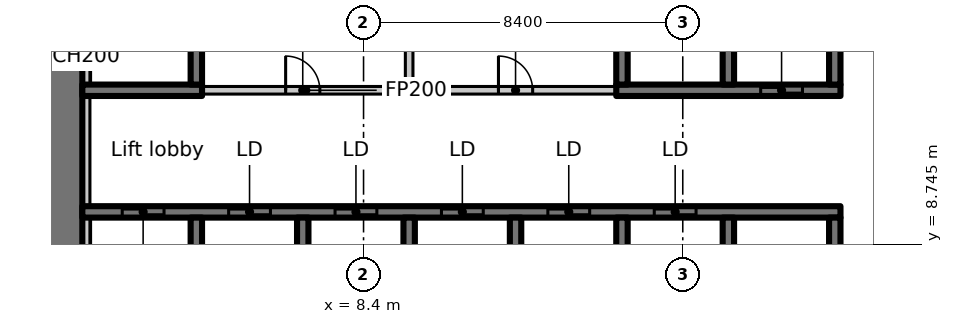
"""IFC4 building model, lengths in metres.
Left out: names, types, materials, properties, quantities, classifications, styles, units other than length and angle.
Written with IfcOpenShell. Run it as: python <this file> out.ifc"""

import sys

from ifc_helpers import new_model, si_unit, direction, frame, frame_2d, origin, place, context, subcontext, project, spatial, rectangle, extrude, element, fill, save


model = new_model("IFC4")
c1 = context("Model", 3, precision=1e-05, world=origin(), true_north=direction((0.0, 1.0)))
c2 = subcontext(c1, "Body", "Model", "MODEL_VIEW")
j1 = project(units=[si_unit("LENGTHUNIT", "METRE"), si_unit("PLANEANGLEUNIT", "RADIAN")], contexts=[c1])
p1 = place(None, origin())
s1 = spatial("IfcSite", under=j1, at=p1, CompositionType="ELEMENT")
p2 = place(p1, origin())
s2 = spatial("IfcBuilding", under=s1, at=p2, CompositionType="ELEMENT")
p3 = place(p2, frame((0.0, 0.0, 65.3)))
s3 = spatial("IfcBuildingStorey", under=s2, at=p3, CompositionType="ELEMENT", Elevation=65.3)
p4 = place(p3, frame((0.5, 6.936, 0.0), z_axis=(0.0, 0.0, 1.0), x_axis=(0.0, 1.0, 0.0)))
e1 = element("IfcWall", 1, at=p4, inside=s3, PredefinedType="SHEAR", context=c2, shape_type="SweptSolid", body=[
    extrude(rectangle(XDim=8.864, YDim=1.0, at=frame_2d((4.432, 0.0))), origin(), (0.0, 0.0, 1.0), 3.35),
])
p5 = place(p3, frame((1.0, 9.6, 0.0), z_axis=(0.0, 0.0, 1.0), x_axis=(1.0, 0.0, 0.0)))
e2 = element("IfcWall", 2, at=p5, inside=s3, PredefinedType="SHEAR", context=c2, shape_type="SweptSolid", body=[
    extrude(rectangle(XDim=19.95, YDim=0.3, at=frame_2d((9.975, 0.0))), origin(), (0.0, 0.0, 1.0), 3.35),
])
p6 = place(p5, frame((1.05, 0.0, 0.0)))
e3 = element("IfcOpeningElement", 3, at=p6, cuts=e2, PredefinedType="OPENING", context=c2, shape_type="SweptSolid", body=[
    extrude(rectangle(XDim=1.1, YDim=2.3, at=frame_2d((0.55, 1.15))), frame((0.0, 0.16, 0.0), z_axis=(0.0, -1.0, 0.0), x_axis=(1.0, 0.0, 0.0)), (0.0, 0.0, 1.0), 0.32),
])
p7 = place(p5, frame((3.85, 0.0, 0.0)))
e4 = element("IfcOpeningElement", 4, at=p7, cuts=e2, PredefinedType="OPENING", context=c2, shape_type="SweptSolid", body=[
    extrude(rectangle(XDim=1.1, YDim=2.3, at=frame_2d((0.55, 1.15))), frame((0.0, 0.16, 0.0), z_axis=(0.0, -1.0, 0.0), x_axis=(1.0, 0.0, 0.0)), (0.0, 0.0, 1.0), 0.32),
])
p8 = place(p5, frame((6.65, 0.0, 0.0)))
e5 = element("IfcOpeningElement", 5, at=p8, cuts=e2, PredefinedType="OPENING", context=c2, shape_type="SweptSolid", body=[
    extrude(rectangle(XDim=1.1, YDim=2.3, at=frame_2d((0.55, 1.15))), frame((0.0, 0.16, 0.0), z_axis=(0.0, -1.0, 0.0), x_axis=(1.0, 0.0, 0.0)), (0.0, 0.0, 1.0), 0.32),
])
p9 = place(p5, frame((9.45, 0.0, 0.0)))
e6 = element("IfcOpeningElement", 6, at=p9, cuts=e2, PredefinedType="OPENING", context=c2, shape_type="SweptSolid", body=[
    extrude(rectangle(XDim=1.1, YDim=2.3, at=frame_2d((0.55, 1.15))), frame((0.0, 0.16, 0.0), z_axis=(0.0, -1.0, 0.0), x_axis=(1.0, 0.0, 0.0)), (0.0, 0.0, 1.0), 0.32),
])
p10 = place(p5, frame((12.25, 0.0, 0.0)))
e7 = element("IfcOpeningElement", 7, at=p10, cuts=e2, PredefinedType="OPENING", context=c2, shape_type="SweptSolid", body=[
    extrude(rectangle(XDim=1.1, YDim=2.3, at=frame_2d((0.55, 1.15))), frame((0.0, 0.16, 0.0), z_axis=(0.0, -1.0, 0.0), x_axis=(1.0, 0.0, 0.0)), (0.0, 0.0, 1.0), 0.32),
])
p11 = place(p5, frame((15.05, 0.0, 0.0)))
e8 = element("IfcOpeningElement", 8, at=p11, cuts=e2, PredefinedType="OPENING", context=c2, shape_type="SweptSolid", body=[
    extrude(rectangle(XDim=1.1, YDim=2.3, at=frame_2d((0.55, 1.15))), frame((0.0, 0.16, 0.0), z_axis=(0.0, -1.0, 0.0), x_axis=(1.0, 0.0, 0.0)), (0.0, 0.0, 1.0), 0.32),
])
for number, where, z_axis, x_axis in (
    (9, (4.0, 7.15, 0.0), (0.0, 0.0, 1.0), (0.0, 1.0, 0.0)),
    (10, (6.8, 7.15, 0.0), (0.0, 0.0, 1.0), (0.0, 1.0, 0.0)),
    (11, (9.6, 7.15, 0.0), (0.0, 0.0, 1.0), (0.0, 1.0, 0.0)),
    (12, (12.4, 7.15, 0.0), (0.0, 0.0, 1.0), (0.0, 1.0, 0.0)),
    (13, (15.2, 7.15, 0.0), (0.0, 0.0, 1.0), (0.0, 1.0, 0.0)),
    (14, (18.0, 7.15, 0.0), (0.0, 0.0, 1.0), (0.0, 1.0, 0.0)),
    (15, (20.8, 7.15, 0.0), (0.0, 0.0, 1.0), (0.0, 1.0, 0.0)),
):
    element("IfcWall", number, at=place(p3, frame(where, z_axis=z_axis, x_axis=x_axis)), inside=s3, PredefinedType="SHEAR", context=c2, shape_type="SweptSolid", body=[
        extrude(rectangle(XDim=2.3, YDim=0.3, at=frame_2d((1.15, 0.0))), origin(), (0.0, 0.0, 1.0), 3.35),
    ])
p12 = place(p3, frame((1.0, 12.8, 0.0), z_axis=(0.0, 0.0, 1.0), x_axis=(1.0, 0.0, 0.0)))
e16 = element("IfcWall", 16, at=p12, inside=s3, PredefinedType="SHEAR", context=c2, shape_type="SweptSolid", body=[
    extrude(rectangle(XDim=3.15, YDim=0.3, at=frame_2d((1.575, 0.0))), origin(), (0.0, 0.0, 1.0), 3.35),
])
p13 = place(p3, frame((4.0, 12.95, 0.0), z_axis=(0.0, 0.0, 1.0), x_axis=(0.0, 1.0, 0.0)))
e17 = element("IfcWall", 17, at=p13, inside=s3, PredefinedType="SHEAR", context=c2, shape_type="SweptSolid", body=[
    extrude(rectangle(XDim=2.85, YDim=0.3, at=frame_2d((1.425, 0.0))), origin(), (0.0, 0.0, 1.0), 3.35),
])
p14 = place(p3, frame((15.05, 12.8, 0.0), z_axis=(0.0, 0.0, 1.0), x_axis=(1.0, 0.0, 0.0)))
e18 = element("IfcWall", 18, at=p14, inside=s3, PredefinedType="SHEAR", context=c2, shape_type="SweptSolid", body=[
    extrude(rectangle(XDim=5.9, YDim=0.3, at=frame_2d((2.95, 0.0))), origin(), (0.0, 0.0, 1.0), 3.35),
])
p15 = place(p14, frame((3.8, 0.0, 0.0)))
e19 = element("IfcOpeningElement", 19, at=p15, cuts=e18, PredefinedType="OPENING", context=c2, shape_type="SweptSolid", body=[
    extrude(rectangle(XDim=1.1, YDim=2.3, at=frame_2d((0.55, 1.15))), frame((0.0, 0.16, 0.0), z_axis=(0.0, -1.0, 0.0), x_axis=(1.0, 0.0, 0.0)), (0.0, 0.0, 1.0), 0.32),
])
for number, where, z_axis, x_axis in (
    (20, (15.2, 12.95, 0.0), (0.0, 0.0, 1.0), (0.0, 1.0, 0.0)),
    (21, (18.0, 12.95, 0.0), (0.0, 0.0, 1.0), (0.0, 1.0, 0.0)),
    (22, (20.8, 12.95, 0.0), (0.0, 0.0, 1.0), (0.0, 1.0, 0.0)),
):
    element("IfcWall", number, at=place(p3, frame(where, z_axis=z_axis, x_axis=x_axis)), inside=s3, PredefinedType="SHEAR", context=c2, shape_type="SweptSolid", body=[
        extrude(rectangle(XDim=2.85, YDim=0.3, at=frame_2d((1.425, 0.0))), origin(), (0.0, 0.0, 1.0), 3.35),
    ])
p16 = place(p3, frame((4.162, 12.8, 0.0), z_axis=(0.0, 0.0, 1.0), x_axis=(1.0, 0.0, 0.0)))
e23 = element("IfcWall", 23, at=p16, inside=s3, PredefinedType="PARTITIONING", context=c2, shape_type="SweptSolid", body=[
    extrude(rectangle(XDim=5.438, YDim=0.2, at=frame_2d((2.719, 0.0))), origin(), (0.0, 0.0, 1.0), 3.35),
])
p17 = place(p16, frame((2.188, 0.0, 0.0)))
e24 = element("IfcOpeningElement", 24, at=p17, cuts=e23, PredefinedType="OPENING", context=c2, shape_type="SweptSolid", body=[
    extrude(rectangle(XDim=0.9, YDim=2.1, at=frame_2d((0.45, 1.05))), frame((0.0, 0.11, 0.0), z_axis=(0.0, -1.0, 0.0), x_axis=(1.0, 0.0, 0.0)), (0.0, 0.0, 1.0), 0.22),
])
p18 = place(p3, frame((9.6, 12.8, 0.0), z_axis=(0.0, 0.0, 1.0), x_axis=(1.0, 0.0, 0.0)))
e25 = element("IfcWall", 25, at=p18, inside=s3, PredefinedType="PARTITIONING", context=c2, shape_type="SweptSolid", body=[
    extrude(rectangle(XDim=5.438, YDim=0.2, at=frame_2d((2.719, 0.0))), origin(), (0.0, 0.0, 1.0), 3.35),
])
p19 = place(p18, frame((2.35, 0.0, 0.0)))
e26 = element("IfcOpeningElement", 26, at=p19, cuts=e25, PredefinedType="OPENING", context=c2, shape_type="SweptSolid", body=[
    extrude(rectangle(XDim=0.9, YDim=2.1, at=frame_2d((0.45, 1.05))), frame((0.0, 0.11, 0.0), z_axis=(0.0, -1.0, 0.0), x_axis=(1.0, 0.0, 0.0)), (0.0, 0.0, 1.0), 0.22),
])
p20 = place(p3, frame((9.6, 15.588, 0.0), z_axis=(0.0, 0.0, 1.0), x_axis=(0.0, -1.0, 0.0)))
e27 = element("IfcWall", 27, at=p20, inside=s3, PredefinedType="PARTITIONING", context=c2, shape_type="SweptSolid", body=[
    extrude(rectangle(XDim=2.688, YDim=0.2, at=frame_2d((1.344, 0.0))), origin(), (0.0, 0.0, 1.0), 3.35),
])
p21 = place(p3, frame((1.1, 7.15, 0.0), z_axis=(0.0, 0.0, 1.0), x_axis=(0.0, 1.0, 0.0)))
e28 = element("IfcWall", 28, at=p21, inside=s3, PredefinedType="PARTITIONING", context=c2, shape_type="SweptSolid", body=[
    extrude(rectangle(XDim=2.3, YDim=0.2, at=frame_2d((1.15, 0.0))), origin(), (0.0, 0.0, 1.0), 3.35),
])
p22 = place(p3, frame((1.1, 9.75, 0.0), z_axis=(0.0, 0.0, 1.0), x_axis=(0.0, 1.0, 0.0)))
e29 = element("IfcWall", 29, at=p22, inside=s3, PredefinedType="PARTITIONING", context=c2, shape_type="SweptSolid", body=[
    extrude(rectangle(XDim=2.9, YDim=0.2, at=frame_2d((1.45, 0.0))), origin(), (0.0, 0.0, 1.0), 3.35),
])
p23 = place(p3, frame((1.1, 12.95, 0.0), z_axis=(0.0, 0.0, 1.0), x_axis=(0.0, 1.0, 0.0)))
e30 = element("IfcWall", 30, at=p23, inside=s3, PredefinedType="PARTITIONING", context=c2, shape_type="SweptSolid", body=[
    extrude(rectangle(XDim=2.65, YDim=0.2, at=frame_2d((1.325, 0.0))), origin(), (0.0, 0.0, 1.0), 3.35),
])
p24 = place(p6, origin())
e31 = element("IfcDoor", 31, at=p24, inside=s3, OperationType="SLIDING_TO_LEFT", PredefinedType="DOOR", context=c2, shape_type="SweptSolid", body=[
    extrude(rectangle(XDim=1.1, YDim=2.3, at=frame_2d((0.55, 1.15))), frame((0.0, 0.025, 0.0), z_axis=(0.0, -1.0, 0.0), x_axis=(1.0, 0.0, 0.0)), (0.0, 0.0, 1.0), 0.05),
])
fill(e3, e31)
p25 = place(p7, origin())
e32 = element("IfcDoor", 32, at=p25, inside=s3, OperationType="SLIDING_TO_LEFT", PredefinedType="DOOR", context=c2, shape_type="SweptSolid", body=[
    extrude(rectangle(XDim=1.1, YDim=2.3, at=frame_2d((0.55, 1.15))), frame((0.0, 0.025, 0.0), z_axis=(0.0, -1.0, 0.0), x_axis=(1.0, 0.0, 0.0)), (0.0, 0.0, 1.0), 0.05),
])
fill(e4, e32)
p26 = place(p8, origin())
e33 = element("IfcDoor", 33, at=p26, inside=s3, OperationType="SLIDING_TO_LEFT", PredefinedType="DOOR", context=c2, shape_type="SweptSolid", body=[
    extrude(rectangle(XDim=1.1, YDim=2.3, at=frame_2d((0.55, 1.15))), frame((0.0, 0.025, 0.0), z_axis=(0.0, -1.0, 0.0), x_axis=(1.0, 0.0, 0.0)), (0.0, 0.0, 1.0), 0.05),
])
fill(e5, e33)
p27 = place(p9, origin())
e34 = element("IfcDoor", 34, at=p27, inside=s3, OperationType="SLIDING_TO_LEFT", PredefinedType="DOOR", context=c2, shape_type="SweptSolid", body=[
    extrude(rectangle(XDim=1.1, YDim=2.3, at=frame_2d((0.55, 1.15))), frame((0.0, 0.025, 0.0), z_axis=(0.0, -1.0, 0.0), x_axis=(1.0, 0.0, 0.0)), (0.0, 0.0, 1.0), 0.05),
])
fill(e6, e34)
p28 = place(p10, origin())
e35 = element("IfcDoor", 35, at=p28, inside=s3, OperationType="SLIDING_TO_LEFT", PredefinedType="DOOR", context=c2, shape_type="SweptSolid", body=[
    extrude(rectangle(XDim=1.1, YDim=2.3, at=frame_2d((0.55, 1.15))), frame((0.0, 0.025, 0.0), z_axis=(0.0, -1.0, 0.0), x_axis=(1.0, 0.0, 0.0)), (0.0, 0.0, 1.0), 0.05),
])
fill(e7, e35)
p29 = place(p11, origin())
e36 = element("IfcDoor", 36, at=p29, inside=s3, OperationType="SLIDING_TO_LEFT", PredefinedType="DOOR", context=c2, shape_type="SweptSolid", body=[
    extrude(rectangle(XDim=1.1, YDim=2.3, at=frame_2d((0.55, 1.15))), frame((0.0, 0.025, 0.0), z_axis=(0.0, -1.0, 0.0), x_axis=(1.0, 0.0, 0.0)), (0.0, 0.0, 1.0), 0.05),
])
fill(e8, e36)
p30 = place(p15, origin())
e37 = element("IfcDoor", 37, at=p30, inside=s3, OperationType="SLIDING_TO_LEFT", PredefinedType="DOOR", context=c2, shape_type="SweptSolid", body=[
    extrude(rectangle(XDim=1.1, YDim=2.3, at=frame_2d((0.55, 1.15))), frame((0.0, 0.025, 0.0), z_axis=(0.0, -1.0, 0.0), x_axis=(1.0, 0.0, 0.0)), (0.0, 0.0, 1.0), 0.05),
])
fill(e19, e37)
p31 = place(p17, origin())
e38 = element("IfcDoor", 38, at=p31, inside=s3, OperationType="SINGLE_SWING_RIGHT", PredefinedType="DOOR", context=c2, shape_type="SweptSolid", body=[
    extrude(rectangle(XDim=0.9, YDim=2.1, at=frame_2d((0.45, 1.05))), frame((0.0, 0.025, 0.0), z_axis=(0.0, -1.0, 0.0), x_axis=(1.0, 0.0, 0.0)), (0.0, 0.0, 1.0), 0.05),
])
fill(e24, e38)
p32 = place(p19, origin())
e39 = element("IfcDoor", 39, at=p32, inside=s3, OperationType="SINGLE_SWING_LEFT", PredefinedType="DOOR", context=c2, shape_type="SweptSolid", body=[
    extrude(rectangle(XDim=0.9, YDim=2.1, at=frame_2d((0.45, 1.05))), frame((0.0, 0.025, 0.0), z_axis=(0.0, -1.0, 0.0), x_axis=(1.0, 0.0, 0.0)), (0.0, 0.0, 1.0), 0.05),
])
fill(e26, e39)
save(model, sys.argv[1])
